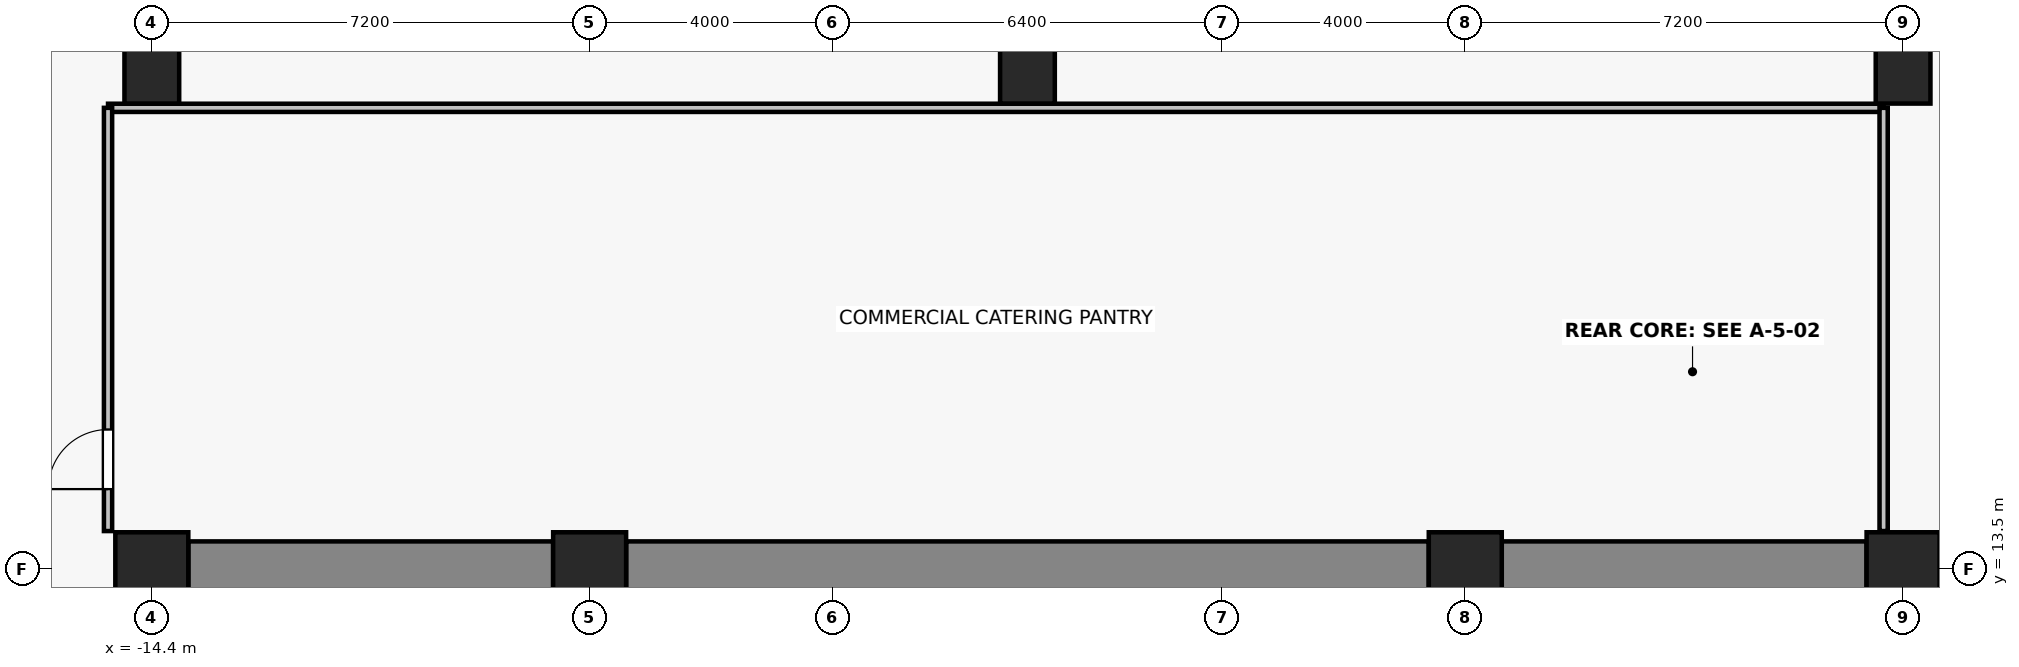
"""IFC4 building model, lengths in metres.
Left out: names, types, materials, properties, quantities, classifications, styles, units other than length and angle.
Written with IfcOpenShell. Run it as: python <this file> out.ifc"""

import sys

from ifc_helpers import new_model, si_unit, direction, frame, frame_2d, origin, origin_2d, place, context, subcontext, project, spatial, rectangle, extrude, source, transform, mapped, element, fill, save


model = new_model("IFC4")
c1 = context("Model", 3, precision=1e-05, world=origin(), true_north=direction((0.0, 1.0)))
c2 = subcontext(c1, "Body", "Model", "MODEL_VIEW")
j1 = project(units=[si_unit("LENGTHUNIT", "METRE"), si_unit("PLANEANGLEUNIT", "RADIAN")], contexts=[c1])
p1 = place(None, origin())
s1 = spatial("IfcSite", under=j1, at=p1, CompositionType="ELEMENT")
p2 = place(p1, origin())
s2 = spatial("IfcBuilding", under=s1, at=p2, CompositionType="ELEMENT")
p3 = place(p2, frame((0.0, 0.0, 18.2)))
s3 = spatial("IfcBuildingStorey", under=s2, at=p3, CompositionType="ELEMENT", Elevation=18.2)
for number, where, z_axis, x_axis in (
    (1, (-14.4, 13.5, 0.0), (0.0, 0.0, 1.0), (1.0, 0.0, 0.0)),
    (2, (-7.2, 13.5, 0.0), (0.0, 0.0, 1.0), (1.0, 0.0, 0.0)),
    (3, (7.2, 13.5, 0.0), (0.0, 0.0, 1.0), (1.0, 0.0, 0.0)),
    (4, (14.4, 13.5, 0.0), (0.0, 0.0, 1.0), (1.0, 0.0, 0.0)),
):
    element("IfcColumn", number, at=place(p3, frame(where, z_axis=z_axis, x_axis=x_axis)), inside=s3, PredefinedType="COLUMN", context=c2, shape_type="SweptSolid", body=[
        extrude(rectangle(XDim=1.2, YDim=1.2, at=origin_2d()), origin(), (0.0, 0.0, 1.0), 4.4),
    ])
for number, where, z_axis, x_axis in (
    (5, (-14.4, 21.6, 0.0), (0.0, 0.0, 1.0), (1.0, 0.0, 0.0)),
    (6, (0.0, 21.6, 0.0), (0.0, 0.0, 1.0), (1.0, 0.0, 0.0)),
    (7, (14.4, 21.6, 0.0), (0.0, 0.0, 1.0), (1.0, 0.0, 0.0)),
):
    element("IfcColumn", number, at=place(p3, frame(where, z_axis=z_axis, x_axis=x_axis)), inside=s3, PredefinedType="COLUMN", context=c2, shape_type="SweptSolid", body=[
        extrude(rectangle(XDim=0.9, YDim=0.9, at=origin_2d()), origin(), (0.0, 0.0, 1.0), 4.4),
    ])
p4 = place(p3, frame((-13.8, 13.5, 0.0), z_axis=(0.0, 0.0, 1.0), x_axis=(1.0, 0.0, 0.0)))
e8 = element("IfcWall", 8, at=p4, inside=s3, PredefinedType="SHEAR", context=c2, shape_type="SweptSolid", body=[
    extrude(rectangle(XDim=6.0, YDim=0.9, at=frame_2d((3.0, 0.0))), origin(), (0.0, 0.0, 1.0), 4.1),
])
p5 = place(p3, frame((-6.6, 13.5, 0.0), z_axis=(0.0, 0.0, 1.0), x_axis=(1.0, 0.0, 0.0)))
e9 = element("IfcWall", 9, at=p5, inside=s3, PredefinedType="SHEAR", context=c2, shape_type="SweptSolid", body=[
    extrude(rectangle(XDim=13.2, YDim=0.9, at=frame_2d((6.6, 0.0))), origin(), (0.0, 0.0, 1.0), 4.1),
])
p6 = place(p3, frame((7.8, 13.5, 0.0), z_axis=(0.0, 0.0, 1.0), x_axis=(1.0, 0.0, 0.0)))
e10 = element("IfcWall", 10, at=p6, inside=s3, PredefinedType="SHEAR", context=c2, shape_type="SweptSolid", body=[
    extrude(rectangle(XDim=6.0, YDim=0.9, at=frame_2d((3.0, 0.0))), origin(), (0.0, 0.0, 1.0), 4.1),
])
p7 = place(p3, frame((-15.12, 21.08, 0.0), z_axis=(0.0, 0.0, 1.0), x_axis=(1.0, 0.0, 0.0)))
e11 = element("IfcWall", 11, at=p7, inside=s3, PredefinedType="PARTITIONING", context=c2, shape_type="SweptSolid", body=[
    extrude(rectangle(XDim=29.2, YDim=0.135, at=frame_2d((14.6, 0.0))), origin(), (0.0, 0.0, 1.0), 3.19),
])
p8 = place(p3, frame((-15.12, 14.12, 0.0), z_axis=(0.0, 0.0, 1.0), x_axis=(0.0, 1.0, 0.0)))
e12 = element("IfcWall", 12, at=p8, inside=s3, PredefinedType="PARTITIONING", context=c2, shape_type="SweptSolid", body=[
    extrude(rectangle(XDim=6.96, YDim=0.135, at=frame_2d((3.48, 0.0))), origin(), (0.0, 0.0, 1.0), 3.473),
])
p9 = place(p8, frame((0.69, 0.0, 0.0)))
e13 = element("IfcOpeningElement", 13, at=p9, cuts=e12, PredefinedType="OPENING", context=c2, shape_type="SweptSolid", body=[
    extrude(rectangle(XDim=0.98, YDim=2.15, at=frame_2d((0.49, 1.075))), frame((0.0, 0.077, 0.0), z_axis=(0.0, -1.0, 0.0), x_axis=(1.0, 0.0, 0.0)), (0.0, 0.0, 1.0), 0.155),
])
p10 = place(p3, frame((14.08, 21.08, 0.0), z_axis=(0.0, 0.0, 1.0), x_axis=(0.0, -1.0, 0.0)))
e14 = element("IfcWall", 14, at=p10, inside=s3, PredefinedType="PARTITIONING", context=c2, shape_type="SweptSolid", body=[
    extrude(rectangle(XDim=6.96, YDim=0.135, at=frame_2d((3.48, 0.0))), origin(), (0.0, 0.0, 1.0), 3.473),
])
m1 = source(origin(), c2, "Body", "SweptSolid", [
    extrude(rectangle(XDim=0.98, YDim=2.15, at=frame_2d((0.49, 1.075))), frame((0.0, 0.025, 0.0), z_axis=(0.0, -1.0, 0.0), x_axis=(1.0, 0.0, 0.0)), (0.0, 0.0, 1.0), 0.05),
])
p11 = place(p9, origin())
e15 = element("IfcDoor", 15, at=p11, inside=s3, OperationType="SINGLE_SWING_LEFT", PredefinedType="DOOR", context=c2, shape_type="MappedRepresentation", body=[
    mapped(m1, transform((0.0, 0.0, 0.0), x_axis=(1.0, 0.0, 0.0), y_axis=(0.0, 1.0, 0.0), z_axis=(0.0, 0.0, 1.0), scale=1.0)),
])
fill(e13, e15)
save(model, sys.argv[1])
